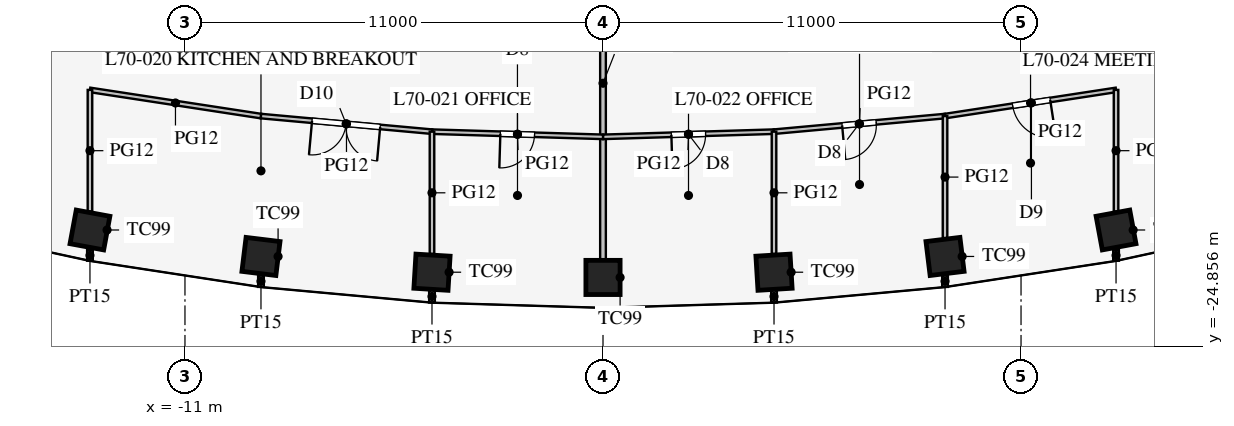
"""IFC4 building model, lengths in metres.
Left out: names, types, materials, properties, quantities, classifications, styles, units other than length and angle.
Written with IfcOpenShell. Run it as: python <this file> out.ifc"""

import sys

from ifc_helpers import new_model, si_unit, direction, frame, frame_2d, origin, origin_2d, place, context, subcontext, project, spatial, rectangle, extrude, element, fill, save


model = new_model("IFC4")
c1 = context("Model", 3, precision=1e-05, world=origin(), true_north=direction((0.0, 1.0)))
c2 = subcontext(c1, "Body", "Model", "MODEL_VIEW")
j1 = project(units=[si_unit("LENGTHUNIT", "METRE"), si_unit("PLANEANGLEUNIT", "RADIAN")], contexts=[c1])
p1 = place(None, origin())
s1 = spatial("IfcSite", under=j1, at=p1, CompositionType="ELEMENT")
p2 = place(p1, origin())
s2 = spatial("IfcBuilding", under=s1, at=p2, CompositionType="ELEMENT")
p3 = place(p2, frame((0.0, 0.0, 305.7)))
s3 = spatial("IfcBuildingStorey", under=s2, at=p3, CompositionType="ELEMENT", Elevation=305.7)
for number, where, z_axis, x_axis in (
    (1, (-13.5, -21.803, 0.0), (0.0, 0.0, 1.0), (0.983, -0.182, 0.0)),
    (2, (-9.0, -22.499, 0.0), (0.0, 0.0, 1.0), (0.993, -0.121, 0.0)),
    (3, (-4.5, -22.914, 0.0), (0.0, 0.0, 1.0), (0.998, -0.061, 0.0)),
    (4, (0.0, -23.052, 0.0), (0.0, 0.0, 1.0), (1.0, 0.0, 0.0)),
    (5, (4.5, -22.914, 0.0), (0.0, 0.0, 1.0), (0.998, 0.061, 0.0)),
    (6, (9.0, -22.499, 0.0), (0.0, 0.0, 1.0), (0.993, 0.121, 0.0)),
    (7, (13.5, -21.803, 0.0), (0.0, 0.0, 1.0), (0.983, 0.182, 0.0)),
):
    element("IfcColumn", number, at=place(p3, frame(where, z_axis=z_axis, x_axis=x_axis)), inside=s3, PredefinedType="COLUMN", context=c2, shape_type="SweptSolid", body=[
        extrude(rectangle(XDim=0.9, YDim=0.9, at=origin_2d()), origin(), (0.0, 0.0, 1.0), 4.2),
    ])
p4 = place(p3, frame((0.0, -13.31, 0.0), z_axis=(0.0, 0.0, 1.0), x_axis=(0.0, -1.0, 0.0)))
e8 = element("IfcWall", 8, at=p4, inside=s3, PredefinedType="PARTITIONING", context=c2, shape_type="SweptSolid", body=[
    extrude(rectangle(XDim=9.261, YDim=0.15, at=frame_2d((4.631, 0.0))), origin(), (0.0, 0.0, 1.0), 3.3),
])
p5 = place(p3, frame((13.5, -22.331, 0.0), z_axis=(0.0, 0.0, 1.0), x_axis=(0.0, -1.0, 0.0)))
e9 = element("IfcWall", 9, at=p5, inside=s3, PredefinedType="PARTITIONING", context=c2, shape_type="SweptSolid", body=[
    extrude(rectangle(XDim=0.28, YDim=0.15, at=frame_2d((0.14, 0.0))), origin(), (0.0, 0.0, 1.0), 2.9),
])
p6 = place(p3, frame((4.5, -23.394, 0.0), z_axis=(0.0, 0.0, 1.0), x_axis=(0.0, -1.0, 0.0)))
e10 = element("IfcWall", 10, at=p6, inside=s3, PredefinedType="PARTITIONING", context=c2, shape_type="SweptSolid", body=[
    extrude(rectangle(XDim=0.316, YDim=0.15, at=frame_2d((0.158, 0.0))), origin(), (0.0, 0.0, 1.0), 2.9),
])
p7 = place(p3, frame((9.0, -23.004, 0.0), z_axis=(0.0, 0.0, 1.0), x_axis=(0.0, -1.0, 0.0)))
e11 = element("IfcWall", 11, at=p7, inside=s3, PredefinedType="PARTITIONING", context=c2, shape_type="SweptSolid", body=[
    extrude(rectangle(XDim=0.296, YDim=0.15, at=frame_2d((0.148, 0.0))), origin(), (0.0, 0.0, 1.0), 2.9),
])
p8 = place(p3, frame((-13.5, -22.331, 0.0), z_axis=(0.0, 0.0, 1.0), x_axis=(0.0, -1.0, 0.0)))
e12 = element("IfcWall", 12, at=p8, inside=s3, PredefinedType="PARTITIONING", context=c2, shape_type="SweptSolid", body=[
    extrude(rectangle(XDim=0.28, YDim=0.15, at=frame_2d((0.14, 0.0))), origin(), (0.0, 0.0, 1.0), 2.9),
])
p9 = place(p3, frame((-4.5, -23.394, 0.0), z_axis=(0.0, 0.0, 1.0), x_axis=(0.0, -1.0, 0.0)))
e13 = element("IfcWall", 13, at=p9, inside=s3, PredefinedType="PARTITIONING", context=c2, shape_type="SweptSolid", body=[
    extrude(rectangle(XDim=0.316, YDim=0.15, at=frame_2d((0.158, 0.0))), origin(), (0.0, 0.0, 1.0), 2.9),
])
p10 = place(p3, frame((-9.0, -23.004, 0.0), z_axis=(0.0, 0.0, 1.0), x_axis=(0.0, -1.0, 0.0)))
e14 = element("IfcWall", 14, at=p10, inside=s3, PredefinedType="PARTITIONING", context=c2, shape_type="SweptSolid", body=[
    extrude(rectangle(XDim=0.296, YDim=0.15, at=frame_2d((0.148, 0.0))), origin(), (0.0, 0.0, 1.0), 2.9),
])
p11 = place(p3, frame((0.0, -19.352, 0.0), z_axis=(0.0, 0.0, 1.0), x_axis=(0.999542074227, 0.030259574513, 0.0)))
e15 = element("IfcWall", 15, at=p11, inside=s3, PredefinedType="PARTITIONING", context=c2, shape_type="SweptSolid", body=[
    extrude(rectangle(XDim=4.502, YDim=0.12, at=frame_2d((2.251, 0.0))), origin(), (0.0, 0.0, 1.0), 2.9),
])
p12 = place(p11, frame((1.8, 0.0, 0.15)))
e16 = element("IfcOpeningElement", 16, at=p12, cuts=e15, PredefinedType="OPENING", context=c2, shape_type="SweptSolid", body=[
    extrude(rectangle(XDim=0.9, YDim=2.1, at=frame_2d((0.45, 1.05))), frame((0.0, 0.07, 0.0), z_axis=(0.0, -1.0, 0.0), x_axis=(1.0, 0.0, 0.0)), (0.0, 0.0, 1.0), 0.14),
])
p13 = place(p3, frame((4.5, -19.215, 0.0), z_axis=(0.0, 0.0, 1.0), x_axis=(0.995871921504, 0.090769576179, 0.0)))
e17 = element("IfcWall", 17, at=p13, inside=s3, PredefinedType="PARTITIONING", context=c2, shape_type="SweptSolid", body=[
    extrude(rectangle(XDim=4.519, YDim=0.12, at=frame_2d((2.259, 0.0))), origin(), (0.0, 0.0, 1.0), 2.9),
])
p14 = place(p13, frame((1.8, 0.0, 0.15)))
e18 = element("IfcOpeningElement", 18, at=p14, cuts=e17, PredefinedType="OPENING", context=c2, shape_type="SweptSolid", body=[
    extrude(rectangle(XDim=0.9, YDim=2.1, at=frame_2d((0.45, 1.05))), frame((0.0, 0.07, 0.0), z_axis=(0.0, -1.0, 0.0), x_axis=(1.0, 0.0, 0.0)), (0.0, 0.0, 1.0), 0.14),
])
p15 = place(p3, frame((9.0, -18.805, 0.0), z_axis=(0.0, 0.0, 1.0), x_axis=(0.988481794406, 0.151339823341, 0.0)))
e19 = element("IfcWall", 19, at=p15, inside=s3, PredefinedType="PARTITIONING", context=c2, shape_type="SweptSolid", body=[
    extrude(rectangle(XDim=4.552, YDim=0.12, at=frame_2d((2.276, 0.0))), origin(), (0.0, 0.0, 1.0), 2.9),
])
p16 = place(p15, frame((1.8, 0.0, 0.15)))
e20 = element("IfcOpeningElement", 20, at=p16, cuts=e19, PredefinedType="OPENING", context=c2, shape_type="SweptSolid", body=[
    extrude(rectangle(XDim=1.0, YDim=2.1, at=frame_2d((0.5, 1.05))), frame((0.0, 0.07, 0.0), z_axis=(0.0, -1.0, 0.0), x_axis=(1.0, 0.0, 0.0)), (0.0, 0.0, 1.0), 0.14),
])
p17 = place(p3, frame((-13.5, -18.116, 0.0), z_axis=(0.0, 0.0, 1.0), x_axis=(0.988481794406, -0.151339823341, 0.0)))
e21 = element("IfcWall", 21, at=p17, inside=s3, PredefinedType="PARTITIONING", context=c2, shape_type="SweptSolid", body=[
    extrude(rectangle(XDim=4.552, YDim=0.12, at=frame_2d((2.276, 0.0))), origin(), (0.0, 0.0, 1.0), 2.9),
])
p18 = place(p3, frame((-4.5, -19.215, 0.0), z_axis=(0.0, 0.0, 1.0), x_axis=(0.999542074227, -0.030259574513, 0.0)))
e22 = element("IfcWall", 22, at=p18, inside=s3, PredefinedType="PARTITIONING", context=c2, shape_type="SweptSolid", body=[
    extrude(rectangle(XDim=4.502, YDim=0.12, at=frame_2d((2.251, 0.0))), origin(), (0.0, 0.0, 1.0), 2.9),
])
p19 = place(p18, frame((1.8, 0.0, 0.15)))
e23 = element("IfcOpeningElement", 23, at=p19, cuts=e22, PredefinedType="OPENING", context=c2, shape_type="SweptSolid", body=[
    extrude(rectangle(XDim=0.9, YDim=2.1, at=frame_2d((0.45, 1.05))), frame((0.0, 0.07, 0.0), z_axis=(0.0, -1.0, 0.0), x_axis=(1.0, 0.0, 0.0)), (0.0, 0.0, 1.0), 0.14),
])
p20 = place(p3, frame((-9.0, -18.805, 0.0), z_axis=(0.0, 0.0, 1.0), x_axis=(0.995871921504, -0.090769576179, 0.0)))
e24 = element("IfcWall", 24, at=p20, inside=s3, PredefinedType="PARTITIONING", context=c2, shape_type="SweptSolid", body=[
    extrude(rectangle(XDim=4.519, YDim=0.12, at=frame_2d((2.259, 0.0))), origin(), (0.0, 0.0, 1.0), 2.9),
])
p21 = place(p20, frame((1.35, 0.0, 0.15)))
e25 = element("IfcOpeningElement", 25, at=p21, cuts=e24, PredefinedType="OPENING", context=c2, shape_type="SweptSolid", body=[
    extrude(rectangle(XDim=1.8, YDim=2.1, at=frame_2d((0.9, 1.05))), frame((0.0, 0.07, 0.0), z_axis=(0.0, -1.0, 0.0), x_axis=(1.0, 0.0, 0.0)), (0.0, 0.0, 1.0), 0.14),
])
p22 = place(p3, frame((13.5, -18.116, 0.0), z_axis=(0.0, 0.0, 1.0), x_axis=(0.0, -1.0, 0.0)))
e26 = element("IfcWall", 26, at=p22, inside=s3, PredefinedType="PARTITIONING", context=c2, shape_type="SweptSolid", body=[
    extrude(rectangle(XDim=3.198, YDim=0.12, at=frame_2d((1.599, 0.0))), origin(), (0.0, 0.0, 1.0), 2.9),
])
p23 = place(p3, frame((4.5, -19.215, 0.0), z_axis=(0.0, 0.0, 1.0), x_axis=(0.0, -1.0, 0.0)))
e27 = element("IfcWall", 27, at=p23, inside=s3, PredefinedType="PARTITIONING", context=c2, shape_type="SweptSolid", body=[
    extrude(rectangle(XDim=3.218, YDim=0.12, at=frame_2d((1.609, 0.0))), origin(), (0.0, 0.0, 1.0), 2.9),
])
p24 = place(p3, frame((9.0, -18.805, 0.0), z_axis=(0.0, 0.0, 1.0), x_axis=(0.0, -1.0, 0.0)))
e28 = element("IfcWall", 28, at=p24, inside=s3, PredefinedType="PARTITIONING", context=c2, shape_type="SweptSolid", body=[
    extrude(rectangle(XDim=3.21, YDim=0.12, at=frame_2d((1.605, 0.0))), origin(), (0.0, 0.0, 1.0), 2.9),
])
p25 = place(p3, frame((-13.5, -18.116, 0.0), z_axis=(0.0, 0.0, 1.0), x_axis=(0.0, -1.0, 0.0)))
e29 = element("IfcWall", 29, at=p25, inside=s3, PredefinedType="PARTITIONING", context=c2, shape_type="SweptSolid", body=[
    extrude(rectangle(XDim=3.198, YDim=0.12, at=frame_2d((1.599, 0.0))), origin(), (0.0, 0.0, 1.0), 2.9),
])
p26 = place(p3, frame((-4.5, -19.215, 0.0), z_axis=(0.0, 0.0, 1.0), x_axis=(0.0, -1.0, 0.0)))
e30 = element("IfcWall", 30, at=p26, inside=s3, PredefinedType="PARTITIONING", context=c2, shape_type="SweptSolid", body=[
    extrude(rectangle(XDim=3.218, YDim=0.12, at=frame_2d((1.609, 0.0))), origin(), (0.0, 0.0, 1.0), 2.9),
])
p27 = place(p21, frame((1.8, 0.0, 0.0), z_axis=(0.0, 0.0, 1.0), x_axis=(-1.0, 0.0, 0.0)))
e31 = element("IfcDoor", 31, at=p27, inside=s3, OperationType="DOUBLE_DOOR_SINGLE_SWING", PredefinedType="DOOR", context=c2, shape_type="SweptSolid", body=[
    extrude(rectangle(XDim=1.8, YDim=2.1, at=frame_2d((0.9, 1.05))), frame((0.0, 0.025, 0.0), z_axis=(0.0, -1.0, 0.0), x_axis=(1.0, 0.0, 0.0)), (0.0, 0.0, 1.0), 0.05),
])
fill(e25, e31)
p28 = place(p19, frame((0.9, 0.0, 0.0), z_axis=(0.0, 0.0, 1.0), x_axis=(-1.0, 0.0, 0.0)))
e32 = element("IfcDoor", 32, at=p28, inside=s3, OperationType="SINGLE_SWING_RIGHT", PredefinedType="DOOR", context=c2, shape_type="SweptSolid", body=[
    extrude(rectangle(XDim=0.9, YDim=2.1, at=frame_2d((0.45, 1.05))), frame((0.0, 0.025, 0.0), z_axis=(0.0, -1.0, 0.0), x_axis=(1.0, 0.0, 0.0)), (0.0, 0.0, 1.0), 0.05),
])
fill(e23, e32)
p29 = place(p12, frame((0.9, 0.0, 0.0), z_axis=(0.0, 0.0, 1.0), x_axis=(-1.0, 0.0, 0.0)))
e33 = element("IfcDoor", 33, at=p29, inside=s3, OperationType="SINGLE_SWING_RIGHT", PredefinedType="DOOR", context=c2, shape_type="SweptSolid", body=[
    extrude(rectangle(XDim=0.9, YDim=2.1, at=frame_2d((0.45, 1.05))), frame((0.0, 0.025, 0.0), z_axis=(0.0, -1.0, 0.0), x_axis=(1.0, 0.0, 0.0)), (0.0, 0.0, 1.0), 0.05),
])
fill(e16, e33)
p30 = place(p14, frame((0.9, 0.0, 0.0), z_axis=(0.0, 0.0, 1.0), x_axis=(-1.0, 0.0, 0.0)))
e34 = element("IfcDoor", 34, at=p30, inside=s3, OperationType="SINGLE_SWING_RIGHT", PredefinedType="DOOR", context=c2, shape_type="SweptSolid", body=[
    extrude(rectangle(XDim=0.9, YDim=2.1, at=frame_2d((0.45, 1.05))), frame((0.0, 0.025, 0.0), z_axis=(0.0, -1.0, 0.0), x_axis=(1.0, 0.0, 0.0)), (0.0, 0.0, 1.0), 0.05),
])
fill(e18, e34)
p31 = place(p16, frame((1.0, 0.0, 0.0), z_axis=(0.0, 0.0, 1.0), x_axis=(-1.0, 0.0, 0.0)))
e35 = element("IfcDoor", 35, at=p31, inside=s3, OperationType="SINGLE_SWING_LEFT", PredefinedType="DOOR", context=c2, shape_type="SweptSolid", body=[
    extrude(rectangle(XDim=1.0, YDim=2.1, at=frame_2d((0.5, 1.05))), frame((0.0, 0.025, 0.0), z_axis=(0.0, -1.0, 0.0), x_axis=(1.0, 0.0, 0.0)), (0.0, 0.0, 1.0), 0.05),
])
fill(e20, e35)
save(model, sys.argv[1])
